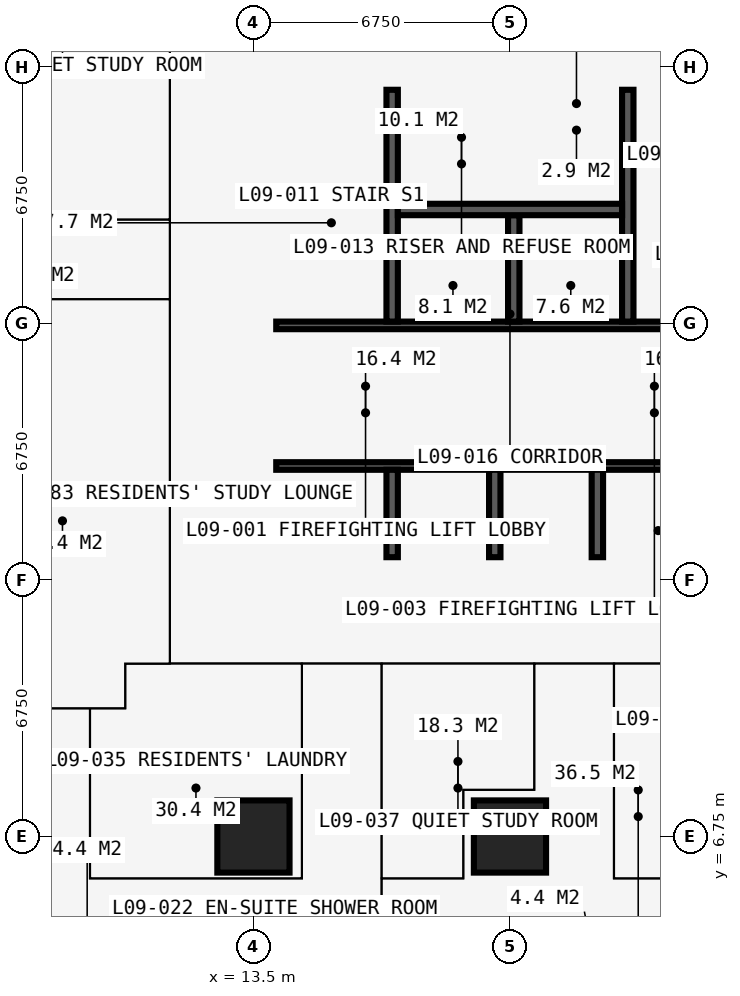
"""IFC4 building model, lengths in metres.
Left out: names, types, materials, properties, quantities, classifications, styles, units other than length and angle.
Written with IfcOpenShell. Run it as: python <this file> out.ifc"""

import sys

from ifc_helpers import new_model, si_unit, direction, frame, frame_2d, origin, origin_2d, place, context, subcontext, project, spatial, rectangle, extrude, element, fill, save


model = new_model("IFC4")
c1 = context("Model", 3, precision=1e-05, world=origin(), true_north=direction((0.0, 1.0)))
c2 = subcontext(c1, "Body", "Model", "MODEL_VIEW")
j1 = project(units=[si_unit("LENGTHUNIT", "METRE"), si_unit("PLANEANGLEUNIT", "RADIAN")], contexts=[c1])
p1 = place(None, origin())
s1 = spatial("IfcSite", under=j1, at=p1, CompositionType="ELEMENT")
p2 = place(p1, origin())
s2 = spatial("IfcBuilding", under=s1, at=p2, CompositionType="ELEMENT")
p3 = place(p2, frame((0.0, 0.0, 36.0)))
s3 = spatial("IfcBuildingStorey", under=s2, at=p3, CompositionType="ELEMENT", Elevation=36.0)
for number, where, z_axis, x_axis in (
    (1, (13.5, 6.75, 0.0), (0.0, 0.0, 1.0), (1.0, 0.0, 0.0)),
    (2, (20.25, 6.75, 0.0), (0.0, 0.0, 1.0), (1.0, 0.0, 0.0)),
):
    element("IfcColumn", number, at=place(p3, frame(where, z_axis=z_axis, x_axis=x_axis)), inside=s3, PredefinedType="COLUMN", context=c2, shape_type="SweptSolid", body=[
        extrude(rectangle(XDim=1.9, YDim=1.9, at=origin_2d()), origin(), (0.0, 0.0, 1.0), 3.6),
    ])
p4 = place(p3, frame((12.9, 13.5, 0.0), z_axis=(0.0, 0.0, 1.0), x_axis=(1.0, 0.0, 0.0)))
e3 = element("IfcWall", 3, at=p4, inside=s3, PredefinedType="SHEAR", context=c2, shape_type="SweptSolid", body=[
    extrude(rectangle(XDim=14.7, YDim=1.2, at=frame_2d((7.35, 0.0))), origin(), (0.0, 0.0, 1.0), 3.6),
])
p5 = place(p3, frame((27.6, 27.0, 0.0), z_axis=(0.0, 0.0, 1.0), x_axis=(-1.0, 0.0, 0.0)))
e4 = element("IfcWall", 4, at=p5, inside=s3, PredefinedType="SHEAR", context=c2, shape_type="SweptSolid", body=[
    extrude(rectangle(XDim=14.7, YDim=1.2, at=frame_2d((7.35, 0.0))), origin(), (0.0, 0.0, 1.0), 3.6),
])
p6 = place(p5, frame((4.55, 0.0, 0.0)))
e5 = element("IfcOpeningElement", 5, at=p6, cuts=e4, PredefinedType="OPENING", context=c2, shape_type="SweptSolid", body=[
    extrude(rectangle(XDim=0.9, YDim=2.2, at=frame_2d((0.45, 1.1))), frame((0.0, 0.61, 0.0), z_axis=(0.0, -1.0, 0.0), x_axis=(1.0, 0.0, 0.0)), (0.0, 0.0, 1.0), 1.22),
])
p7 = place(p5, frame((7.525, 0.0, 0.0)))
e6 = element("IfcOpeningElement", 6, at=p7, cuts=e4, PredefinedType="OPENING", context=c2, shape_type="SweptSolid", body=[
    extrude(rectangle(XDim=1.0, YDim=2.2, at=frame_2d((0.5, 1.1))), frame((0.0, 0.61, 0.0), z_axis=(0.0, -1.0, 0.0), x_axis=(1.0, 0.0, 0.0)), (0.0, 0.0, 1.0), 1.22),
])
p8 = place(p3, frame((13.5, 26.4, 0.0), z_axis=(0.0, 0.0, 1.0), x_axis=(0.0, -1.0, 0.0)))
e7 = element("IfcWall", 7, at=p8, inside=s3, PredefinedType="SHEAR", context=c2, shape_type="SweptSolid", body=[
    extrude(rectangle(XDim=12.3, YDim=1.2, at=frame_2d((6.15, 0.0))), origin(), (0.0, 0.0, 1.0), 3.6),
])
p9 = place(p8, frame((7.45, 0.0, 0.0)))
e8 = element("IfcOpeningElement", 8, at=p9, cuts=e7, PredefinedType="OPENING", context=c2, shape_type="SweptSolid", body=[
    extrude(rectangle(XDim=1.2, YDim=2.2, at=frame_2d((0.6, 1.1))), frame((0.0, 0.61, 0.0), z_axis=(0.0, -1.0, 0.0), x_axis=(1.0, 0.0, 0.0)), (0.0, 0.0, 1.0), 1.22),
])
p10 = place(p3, frame((14.1, 16.5, 0.0), z_axis=(0.0, 0.0, 1.0), x_axis=(1.0, 0.0, 0.0)))
e9 = element("IfcWall", 9, at=p10, inside=s3, PredefinedType="SHEAR", context=c2, shape_type="SweptSolid", body=[
    extrude(rectangle(XDim=12.3, YDim=0.2, at=frame_2d((6.15, 0.0))), origin(), (0.0, 0.0, 1.0), 3.6),
])
p11 = place(p10, frame((0.9, 0.0, 0.0)))
e10 = element("IfcOpeningElement", 10, at=p11, cuts=e9, PredefinedType="OPENING", context=c2, shape_type="SweptSolid", body=[
    extrude(rectangle(XDim=1.1, YDim=2.2, at=frame_2d((0.55, 1.1))), frame((0.0, 0.11, 0.0), z_axis=(0.0, -1.0, 0.0), x_axis=(1.0, 0.0, 0.0)), (0.0, 0.0, 1.0), 0.22),
])
p12 = place(p10, frame((9.5, 0.0, 0.0)))
e11 = element("IfcOpeningElement", 11, at=p12, cuts=e9, PredefinedType="OPENING", context=c2, shape_type="SweptSolid", body=[
    extrude(rectangle(XDim=1.1, YDim=2.2, at=frame_2d((0.55, 1.1))), frame((0.0, 0.11, 0.0), z_axis=(0.0, -1.0, 0.0), x_axis=(1.0, 0.0, 0.0)), (0.0, 0.0, 1.0), 0.22),
])
p13 = place(p3, frame((14.1, 20.2, 0.0), z_axis=(0.0, 0.0, 1.0), x_axis=(1.0, 0.0, 0.0)))
e12 = element("IfcWall", 12, at=p13, inside=s3, PredefinedType="SHEAR", context=c2, shape_type="SweptSolid", body=[
    extrude(rectangle(XDim=12.3, YDim=0.2, at=frame_2d((6.15, 0.0))), origin(), (0.0, 0.0, 1.0), 3.6),
])
p14 = place(p13, frame((0.35, 0.0, 0.0)))
e13 = element("IfcOpeningElement", 13, at=p14, cuts=e12, PredefinedType="OPENING", context=c2, shape_type="SweptSolid", body=[
    extrude(rectangle(XDim=1.1, YDim=2.2, at=frame_2d((0.55, 1.1))), frame((0.0, 0.11, 0.0), z_axis=(0.0, -1.0, 0.0), x_axis=(1.0, 0.0, 0.0)), (0.0, 0.0, 1.0), 0.22),
])
p15 = place(p13, frame((9.75, 0.0, 0.0)))
e14 = element("IfcOpeningElement", 14, at=p15, cuts=e12, PredefinedType="OPENING", context=c2, shape_type="SweptSolid", body=[
    extrude(rectangle(XDim=1.1, YDim=2.2, at=frame_2d((0.55, 1.1))), frame((0.0, 0.11, 0.0), z_axis=(0.0, -1.0, 0.0), x_axis=(1.0, 0.0, 0.0)), (0.0, 0.0, 1.0), 0.22),
])
for number, where, z_axis, x_axis in (
    (15, (17.15, 20.3, 0.0), (0.0, 0.0, 1.0), (0.0, 1.0, 0.0)),
    (16, (23.35, 20.3, 0.0), (0.0, 0.0, 1.0), (0.0, 1.0, 0.0)),
):
    element("IfcWall", number, at=place(p3, frame(where, z_axis=z_axis, x_axis=x_axis)), inside=s3, PredefinedType="SHEAR", context=c2, shape_type="SweptSolid", body=[
        extrude(rectangle(XDim=6.1, YDim=0.3, at=frame_2d((3.05, 0.0))), origin(), (0.0, 0.0, 1.0), 3.6),
    ])
p16 = place(p3, frame((20.35, 20.3, 0.0), z_axis=(0.0, 0.0, 1.0), x_axis=(0.0, 1.0, 0.0)))
e17 = element("IfcWall", 17, at=p16, inside=s3, PredefinedType="SHEAR", context=c2, shape_type="SweptSolid", body=[
    extrude(rectangle(XDim=2.8, YDim=0.3, at=frame_2d((1.4, 0.0))), origin(), (0.0, 0.0, 1.0), 3.6),
])
p17 = place(p3, frame((17.3, 23.25, 0.0), z_axis=(0.0, 0.0, 1.0), x_axis=(1.0, 0.0, 0.0)))
e18 = element("IfcWall", 18, at=p17, inside=s3, PredefinedType="SHEAR", context=c2, shape_type="SweptSolid", body=[
    extrude(rectangle(XDim=5.9, YDim=0.3, at=frame_2d((2.95, 0.0))), origin(), (0.0, 0.0, 1.0), 3.6),
])
for number, where, z_axis, x_axis in (
    (19, (17.15, 14.1, 0.0), (0.0, 0.0, 1.0), (0.0, 1.0, 0.0)),
    (20, (19.85, 14.1, 0.0), (0.0, 0.0, 1.0), (0.0, 1.0, 0.0)),
    (21, (22.55, 14.1, 0.0), (0.0, 0.0, 1.0), (0.0, 1.0, 0.0)),
):
    element("IfcWall", number, at=place(p3, frame(where, z_axis=z_axis, x_axis=x_axis)), inside=s3, PredefinedType="SHEAR", context=c2, shape_type="SweptSolid", body=[
        extrude(rectangle(XDim=2.3, YDim=0.3, at=frame_2d((1.15, 0.0))), origin(), (0.0, 0.0, 1.0), 3.6),
    ])
p18 = place(p3, frame((18.875, 16.6, 0.0), z_axis=(0.0, 0.0, 1.0), x_axis=(0.0, 1.0, 0.0)))
e22 = element("IfcWall", 22, at=p18, inside=s3, PredefinedType="PARTITIONING", context=c2, shape_type="SweptSolid", body=[
    extrude(rectangle(XDim=3.5, YDim=0.15, at=frame_2d((1.75, 0.0))), origin(), (0.0, 0.0, 1.0), 3.375),
])
p19 = place(p18, frame((1.15, 0.0, 0.0)))
e23 = element("IfcOpeningElement", 23, at=p19, cuts=e22, PredefinedType="OPENING", context=c2, shape_type="SweptSolid", body=[
    extrude(rectangle(XDim=1.2, YDim=2.2, at=frame_2d((0.6, 1.1))), frame((0.0, 0.085, 0.0), z_axis=(0.0, -1.0, 0.0), x_axis=(1.0, 0.0, 0.0)), (0.0, 0.0, 1.0), 0.17),
])
p20 = place(p3, frame((21.625, 16.6, 0.0), z_axis=(0.0, 0.0, 1.0), x_axis=(0.0, 1.0, 0.0)))
e24 = element("IfcWall", 24, at=p20, inside=s3, PredefinedType="PARTITIONING", context=c2, shape_type="SweptSolid", body=[
    extrude(rectangle(XDim=3.5, YDim=0.15, at=frame_2d((1.75, 0.0))), origin(), (0.0, 0.0, 1.0), 3.375),
])
p21 = place(p20, frame((1.15, 0.0, 0.0)))
e25 = element("IfcOpeningElement", 25, at=p21, cuts=e24, PredefinedType="OPENING", context=c2, shape_type="SweptSolid", body=[
    extrude(rectangle(XDim=1.2, YDim=2.2, at=frame_2d((0.6, 1.1))), frame((0.0, 0.085, 0.0), z_axis=(0.0, -1.0, 0.0), x_axis=(1.0, 0.0, 0.0)), (0.0, 0.0, 1.0), 0.17),
])
p22 = place(p3, frame((20.725, 23.4, 0.0), z_axis=(0.0, 0.0, 1.0), x_axis=(0.0, 1.0, 0.0)))
e26 = element("IfcWall", 26, at=p22, inside=s3, PredefinedType="PARTITIONING", context=c2, shape_type="SweptSolid", body=[
    extrude(rectangle(XDim=3.0, YDim=0.15, at=frame_2d((1.5, 0.0))), origin(), (0.0, 0.0, 1.0), 3.375),
])
p23 = place(p3, frame((20.8, 25.1, 0.0), z_axis=(0.0, 0.0, 1.0), x_axis=(1.0, 0.0, 0.0)))
e27 = element("IfcWall", 27, at=p23, inside=s3, PredefinedType="PARTITIONING", context=c2, shape_type="SweptSolid", body=[
    extrude(rectangle(XDim=2.4, YDim=0.15, at=frame_2d((1.2, 0.0))), origin(), (0.0, 0.0, 1.0), 3.375),
])
p24 = place(p23, frame((0.75, 0.0, 0.0)))
e28 = element("IfcOpeningElement", 28, at=p24, cuts=e27, PredefinedType="OPENING", context=c2, shape_type="SweptSolid", body=[
    extrude(rectangle(XDim=0.9, YDim=2.2, at=frame_2d((0.45, 1.1))), frame((0.0, 0.085, 0.0), z_axis=(0.0, -1.0, 0.0), x_axis=(1.0, 0.0, 0.0)), (0.0, 0.0, 1.0), 0.17),
])
p25 = place(p3, frame((-0.734, 10.125, 0.0), z_axis=(0.0, 0.0, 1.0), x_axis=(1.0, 0.0, 0.0)))
e29 = element("IfcWall", 29, at=p25, inside=s3, PredefinedType="PARTITIONING", context=c2, shape_type="SweptSolid", body=[
    extrude(rectangle(XDim=10.859, YDim=0.15, at=frame_2d((5.429, 0.0))), origin(), (0.0, 0.0, 1.0), 3.375),
])
p26 = place(p25, frame((5.134, 0.0, 0.0)))
e30 = element("IfcOpeningElement", 30, at=p26, cuts=e29, PredefinedType="OPENING", context=c2, shape_type="SweptSolid", body=[
    extrude(rectangle(XDim=1.0, YDim=2.2, at=frame_2d((0.5, 1.1))), frame((0.0, 0.085, 0.0), z_axis=(0.0, -1.0, 0.0), x_axis=(1.0, 0.0, 0.0)), (0.0, 0.0, 1.0), 0.17),
])
for number, where, z_axis, x_axis in (
    (31, (5.65, 20.887, 0.0), (0.0, 0.0, 1.0), (1.0, 0.0, 0.0)),
    (32, (5.65, 22.988, 0.0), (0.0, 0.0, 1.0), (1.0, 0.0, 0.0)),
):
    element("IfcWall", number, at=place(p3, frame(where, z_axis=z_axis, x_axis=x_axis)), inside=s3, PredefinedType="PARTITIONING", context=c2, shape_type="SweptSolid", body=[
        extrude(rectangle(XDim=5.65, YDim=0.15, at=frame_2d((2.825, 0.0))), origin(), (0.0, 0.0, 1.0), 3.375),
    ])
p27 = place(p3, frame((9.2, 5.65, 0.0), z_axis=(0.0, 0.0, 1.0), x_axis=(0.0, 1.0, 0.0)))
e33 = element("IfcWall", 33, at=p27, inside=s3, PredefinedType="PARTITIONING", context=c2, shape_type="SweptSolid", body=[
    extrude(rectangle(XDim=4.475, YDim=0.15, at=frame_2d((2.238, 0.0))), origin(), (0.0, 0.0, 1.0), 3.375),
])
p28 = place(p3, frame((9.2, 5.65, 0.0), z_axis=(0.0, 0.0, 1.0), x_axis=(1.0, 0.0, 0.0)))
e34 = element("IfcWall", 34, at=p28, inside=s3, PredefinedType="PARTITIONING", context=c2, shape_type="SweptSolid", body=[
    extrude(rectangle(XDim=5.575, YDim=0.15, at=frame_2d((2.788, 0.0))), origin(), (0.0, 0.0, 1.0), 3.375),
])
p29 = place(p3, frame((10.125, 10.125, 0.0), z_axis=(0.0, 0.0, 1.0), x_axis=(0.0, 1.0, 0.0)))
e35 = element("IfcWall", 35, at=p29, inside=s3, PredefinedType="PARTITIONING", context=c2, shape_type="SweptSolid", body=[
    extrude(rectangle(XDim=1.175, YDim=0.15, at=frame_2d((0.587, 0.0))), origin(), (0.0, 0.0, 1.0), 3.375),
])
p30 = place(p3, frame((10.125, 11.3, 0.0), z_axis=(0.0, 0.0, 1.0), x_axis=(1.0, 0.0, 0.0)))
e36 = element("IfcWall", 36, at=p30, inside=s3, PredefinedType="PARTITIONING", context=c2, shape_type="SweptSolid", body=[
    extrude(rectangle(XDim=20.675, YDim=0.15, at=frame_2d((10.337, 0.0))), origin(), (0.0, 0.0, 1.0), 3.375),
])
p31 = place(p30, frame((5.2, 0.0, 0.0)))
e37 = element("IfcOpeningElement", 37, at=p31, cuts=e36, PredefinedType="OPENING", context=c2, shape_type="SweptSolid", body=[
    extrude(rectangle(XDim=1.0, YDim=2.2, at=frame_2d((0.5, 1.1))), frame((0.0, 0.085, 0.0), z_axis=(0.0, -1.0, 0.0), x_axis=(1.0, 0.0, 0.0)), (0.0, 0.0, 1.0), 0.17),
])
p32 = place(p30, frame((11.312, 0.0, 0.0)))
e38 = element("IfcOpeningElement", 38, at=p32, cuts=e36, PredefinedType="OPENING", context=c2, shape_type="SweptSolid", body=[
    extrude(rectangle(XDim=1.0, YDim=2.2, at=frame_2d((0.5, 1.1))), frame((0.0, 0.085, 0.0), z_axis=(0.0, -1.0, 0.0), x_axis=(1.0, 0.0, 0.0)), (0.0, 0.0, 1.0), 0.17),
])
p33 = place(p30, frame((2.425, 0.0, 0.0)))
e39 = element("IfcOpeningElement", 39, at=p33, cuts=e36, PredefinedType="OPENING", context=c2, shape_type="SweptSolid", body=[
    extrude(rectangle(XDim=0.95, YDim=2.2, at=frame_2d((0.475, 1.1))), frame((0.0, 0.085, 0.0), z_axis=(0.0, -1.0, 0.0), x_axis=(1.0, 0.0, 0.0)), (0.0, 0.0, 1.0), 0.17),
])
p34 = place(p3, frame((11.3, 11.3, 0.0), z_axis=(0.0, 0.0, 1.0), x_axis=(0.0, 1.0, 0.0)))
e40 = element("IfcWall", 40, at=p34, inside=s3, PredefinedType="PARTITIONING", context=c2, shape_type="SweptSolid", body=[
    extrude(rectangle(XDim=19.075, YDim=0.15, at=frame_2d((9.538, 0.0))), origin(), (0.0, 0.0, 1.0), 3.375),
])
p35 = place(p34, frame((10.137, 0.0, 0.0)))
e41 = element("IfcOpeningElement", 41, at=p35, cuts=e40, PredefinedType="OPENING", context=c2, shape_type="SweptSolid", body=[
    extrude(rectangle(XDim=1.0, YDim=2.2, at=frame_2d((0.5, 1.1))), frame((0.0, 0.085, 0.0), z_axis=(0.0, -1.0, 0.0), x_axis=(1.0, 0.0, 0.0)), (0.0, 0.0, 1.0), 0.17),
])
p36 = place(p3, frame((14.775, 5.65, 0.0), z_axis=(0.0, 0.0, 1.0), x_axis=(0.0, 1.0, 0.0)))
e42 = element("IfcWall", 42, at=p36, inside=s3, PredefinedType="PARTITIONING", context=c2, shape_type="SweptSolid", body=[
    extrude(rectangle(XDim=5.65, YDim=0.15, at=frame_2d((2.825, 0.0))), origin(), (0.0, 0.0, 1.0), 3.375),
])
p37 = place(p3, frame((16.875, -0.734, 0.0), z_axis=(0.0, 0.0, 1.0), x_axis=(0.0, 1.0, 0.0)))
e43 = element("IfcWall", 43, at=p37, inside=s3, PredefinedType="PARTITIONING", context=c2, shape_type="SweptSolid", body=[
    extrude(rectangle(XDim=12.034, YDim=0.15, at=frame_2d((6.017, 0.0))), origin(), (0.0, 0.0, 1.0), 3.375),
])
p38 = place(p3, frame((16.875, 5.65, 0.0), z_axis=(0.0, 0.0, 1.0), x_axis=(1.0, 0.0, 0.0)))
e44 = element("IfcWall", 44, at=p38, inside=s3, PredefinedType="PARTITIONING", context=c2, shape_type="SweptSolid", body=[
    extrude(rectangle(XDim=2.145, YDim=0.15, at=frame_2d((1.073, 0.0))), origin(), (0.0, 0.0, 1.0), 3.375),
])
p39 = place(p3, frame((19.02, 5.65, 0.0), z_axis=(0.0, 0.0, 1.0), x_axis=(0.0, 1.0, 0.0)))
e45 = element("IfcWall", 45, at=p39, inside=s3, PredefinedType="PARTITIONING", context=c2, shape_type="SweptSolid", body=[
    extrude(rectangle(XDim=2.33, YDim=0.15, at=frame_2d((1.165, 0.0))), origin(), (0.0, 0.0, 1.0), 3.375),
])
p40 = place(p3, frame((19.02, 7.98, 0.0), z_axis=(0.0, 0.0, 1.0), x_axis=(1.0, 0.0, 0.0)))
e46 = element("IfcWall", 46, at=p40, inside=s3, PredefinedType="PARTITIONING", context=c2, shape_type="SweptSolid", body=[
    extrude(rectangle(XDim=1.867, YDim=0.15, at=frame_2d((0.934, 0.0))), origin(), (0.0, 0.0, 1.0), 3.375),
])
p41 = place(p3, frame((20.887, 7.98, 0.0), z_axis=(0.0, 0.0, 1.0), x_axis=(0.0, 1.0, 0.0)))
e47 = element("IfcWall", 47, at=p41, inside=s3, PredefinedType="PARTITIONING", context=c2, shape_type="SweptSolid", body=[
    extrude(rectangle(XDim=3.32, YDim=0.15, at=frame_2d((1.66, 0.0))), origin(), (0.0, 0.0, 1.0), 3.375),
])
p42 = place(p41, frame((1.2, 0.0, 0.0)))
e48 = element("IfcOpeningElement", 48, at=p42, cuts=e47, PredefinedType="OPENING", context=c2, shape_type="SweptSolid", body=[
    extrude(rectangle(XDim=0.95, YDim=2.2, at=frame_2d((0.475, 1.1))), frame((0.0, 0.085, 0.0), z_axis=(0.0, -1.0, 0.0), x_axis=(1.0, 0.0, 0.0)), (0.0, 0.0, 1.0), 0.17),
])
p43 = place(p3, frame((22.988, 5.65, 0.0), z_axis=(0.0, 0.0, 1.0), x_axis=(1.0, 0.0, 0.0)))
e49 = element("IfcWall", 49, at=p43, inside=s3, PredefinedType="PARTITIONING", context=c2, shape_type="SweptSolid", body=[
    extrude(rectangle(XDim=7.387, YDim=0.15, at=frame_2d((3.694, 0.0))), origin(), (0.0, 0.0, 1.0), 3.375),
])
p44 = place(p43, frame((2.1, 0.0, 0.0)))
e50 = element("IfcOpeningElement", 50, at=p44, cuts=e49, PredefinedType="OPENING", context=c2, shape_type="SweptSolid", body=[
    extrude(rectangle(XDim=0.95, YDim=2.2, at=frame_2d((0.475, 1.1))), frame((0.0, 0.085, 0.0), z_axis=(0.0, -1.0, 0.0), x_axis=(1.0, 0.0, 0.0)), (0.0, 0.0, 1.0), 0.17),
])
p45 = place(p3, frame((22.988, 5.65, 0.0), z_axis=(0.0, 0.0, 1.0), x_axis=(0.0, 1.0, 0.0)))
e51 = element("IfcWall", 51, at=p45, inside=s3, PredefinedType="PARTITIONING", context=c2, shape_type="SweptSolid", body=[
    extrude(rectangle(XDim=5.65, YDim=0.15, at=frame_2d((2.825, 0.0))), origin(), (0.0, 0.0, 1.0), 3.375),
])
p46 = place(p11, origin())
e52 = element("IfcDoor", 52, at=p46, inside=s3, OperationType="DOUBLE_DOOR_SLIDING", PredefinedType="DOOR", context=c2, shape_type="SweptSolid", body=[
    extrude(rectangle(XDim=1.1, YDim=2.2, at=frame_2d((0.55, 1.1))), frame((0.0, 0.025, 0.0), z_axis=(0.0, -1.0, 0.0), x_axis=(1.0, 0.0, 0.0)), (0.0, 0.0, 1.0), 0.05),
])
fill(e10, e52)
p47 = place(p12, origin())
e53 = element("IfcDoor", 53, at=p47, inside=s3, OperationType="DOUBLE_DOOR_SLIDING", PredefinedType="DOOR", context=c2, shape_type="SweptSolid", body=[
    extrude(rectangle(XDim=1.1, YDim=2.2, at=frame_2d((0.55, 1.1))), frame((0.0, 0.025, 0.0), z_axis=(0.0, -1.0, 0.0), x_axis=(1.0, 0.0, 0.0)), (0.0, 0.0, 1.0), 0.05),
])
fill(e11, e53)
p48 = place(p9, origin())
e54 = element("IfcDoor", 54, at=p48, inside=s3, OperationType="DOUBLE_DOOR_SINGLE_SWING", PredefinedType="DOOR", context=c2, shape_type="SweptSolid", body=[
    extrude(rectangle(XDim=1.2, YDim=2.2, at=frame_2d((0.6, 1.1))), frame((0.0, 0.025, 0.0), z_axis=(0.0, -1.0, 0.0), x_axis=(1.0, 0.0, 0.0)), (0.0, 0.0, 1.0), 0.05),
])
fill(e8, e54)
p49 = place(p19, origin())
e55 = element("IfcDoor", 55, at=p49, inside=s3, OperationType="DOUBLE_DOOR_SINGLE_SWING", PredefinedType="DOOR", context=c2, shape_type="SweptSolid", body=[
    extrude(rectangle(XDim=1.2, YDim=2.2, at=frame_2d((0.6, 1.1))), frame((0.0, 0.025, 0.0), z_axis=(0.0, -1.0, 0.0), x_axis=(1.0, 0.0, 0.0)), (0.0, 0.0, 1.0), 0.05),
])
fill(e23, e55)
p50 = place(p21, origin())
e56 = element("IfcDoor", 56, at=p50, inside=s3, OperationType="DOUBLE_DOOR_SINGLE_SWING", PredefinedType="DOOR", context=c2, shape_type="SweptSolid", body=[
    extrude(rectangle(XDim=1.2, YDim=2.2, at=frame_2d((0.6, 1.1))), frame((0.0, 0.025, 0.0), z_axis=(0.0, -1.0, 0.0), x_axis=(1.0, 0.0, 0.0)), (0.0, 0.0, 1.0), 0.05),
])
fill(e25, e56)
p51 = place(p24, origin())
e57 = element("IfcDoor", 57, at=p51, inside=s3, OperationType="SINGLE_SWING_RIGHT", PredefinedType="DOOR", context=c2, shape_type="SweptSolid", body=[
    extrude(rectangle(XDim=0.9, YDim=2.2, at=frame_2d((0.45, 1.1))), frame((0.0, 0.025, 0.0), z_axis=(0.0, -1.0, 0.0), x_axis=(1.0, 0.0, 0.0)), (0.0, 0.0, 1.0), 0.05),
])
fill(e28, e57)
p52 = place(p6, origin())
e58 = element("IfcDoor", 58, at=p52, inside=s3, OperationType="SINGLE_SWING_LEFT", PredefinedType="DOOR", context=c2, shape_type="SweptSolid", body=[
    extrude(rectangle(XDim=0.9, YDim=2.2, at=frame_2d((0.45, 1.1))), frame((0.0, 0.4, 0.0), z_axis=(0.0, -1.0, 0.0), x_axis=(1.0, 0.0, 0.0)), (0.0, 0.0, 1.0), 0.8),
])
fill(e5, e58)
p53 = place(p7, origin())
e59 = element("IfcDoor", 59, at=p53, inside=s3, OperationType="SINGLE_SWING_LEFT", PredefinedType="DOOR", context=c2, shape_type="SweptSolid", body=[
    extrude(rectangle(XDim=1.0, YDim=2.2, at=frame_2d((0.5, 1.1))), frame((0.0, 0.025, 0.0), z_axis=(0.0, -1.0, 0.0), x_axis=(1.0, 0.0, 0.0)), (0.0, 0.0, 1.0), 0.05),
])
fill(e6, e59)
p54 = place(p14, origin())
e60 = element("IfcDoor", 60, at=p54, inside=s3, OperationType="SINGLE_SWING_LEFT", PredefinedType="DOOR", context=c2, shape_type="SweptSolid", body=[
    extrude(rectangle(XDim=1.1, YDim=2.2, at=frame_2d((0.55, 1.1))), frame((0.0, 0.025, 0.0), z_axis=(0.0, -1.0, 0.0), x_axis=(1.0, 0.0, 0.0)), (0.0, 0.0, 1.0), 0.05),
])
fill(e13, e60)
p55 = place(p15, origin())
e61 = element("IfcDoor", 61, at=p55, inside=s3, OperationType="SINGLE_SWING_LEFT", PredefinedType="DOOR", context=c2, shape_type="SweptSolid", body=[
    extrude(rectangle(XDim=1.1, YDim=2.2, at=frame_2d((0.55, 1.1))), frame((0.0, 0.025, 0.0), z_axis=(0.0, -1.0, 0.0), x_axis=(1.0, 0.0, 0.0)), (0.0, 0.0, 1.0), 0.05),
])
fill(e14, e61)
p56 = place(p31, origin())
e62 = element("IfcDoor", 62, at=p56, inside=s3, OperationType="SINGLE_SWING_LEFT", PredefinedType="DOOR", context=c2, shape_type="SweptSolid", body=[
    extrude(rectangle(XDim=1.0, YDim=2.2, at=frame_2d((0.5, 1.1))), frame((0.0, 0.025, 0.0), z_axis=(0.0, -1.0, 0.0), x_axis=(1.0, 0.0, 0.0)), (0.0, 0.0, 1.0), 0.05),
])
fill(e37, e62)
p57 = place(p32, origin())
e63 = element("IfcDoor", 63, at=p57, inside=s3, OperationType="SINGLE_SWING_LEFT", PredefinedType="DOOR", context=c2, shape_type="SweptSolid", body=[
    extrude(rectangle(XDim=1.0, YDim=2.2, at=frame_2d((0.5, 1.1))), frame((0.0, 0.025, 0.0), z_axis=(0.0, -1.0, 0.0), x_axis=(1.0, 0.0, 0.0)), (0.0, 0.0, 1.0), 0.05),
])
fill(e38, e63)
p58 = place(p33, origin())
e64 = element("IfcDoor", 64, at=p58, inside=s3, OperationType="SINGLE_SWING_LEFT", PredefinedType="DOOR", context=c2, shape_type="SweptSolid", body=[
    extrude(rectangle(XDim=0.95, YDim=2.2, at=frame_2d((0.475, 1.1))), frame((0.0, 0.025, 0.0), z_axis=(0.0, -1.0, 0.0), x_axis=(1.0, 0.0, 0.0)), (0.0, 0.0, 1.0), 0.05),
])
fill(e39, e64)
p59 = place(p42, origin())
e65 = element("IfcDoor", 65, at=p59, inside=s3, OperationType="SINGLE_SWING_LEFT", PredefinedType="DOOR", context=c2, shape_type="SweptSolid", body=[
    extrude(rectangle(XDim=0.95, YDim=2.2, at=frame_2d((0.475, 1.1))), frame((0.0, 0.025, 0.0), z_axis=(0.0, -1.0, 0.0), x_axis=(1.0, 0.0, 0.0)), (0.0, 0.0, 1.0), 0.05),
])
fill(e48, e65)
p60 = place(p35, origin())
e66 = element("IfcDoor", 66, at=p60, inside=s3, OperationType="SINGLE_SWING_LEFT", PredefinedType="DOOR", context=c2, shape_type="SweptSolid", body=[
    extrude(rectangle(XDim=1.0, YDim=2.2, at=frame_2d((0.5, 1.1))), frame((0.0, 0.025, 0.0), z_axis=(0.0, -1.0, 0.0), x_axis=(1.0, 0.0, 0.0)), (0.0, 0.0, 1.0), 0.05),
])
fill(e41, e66)
save(model, sys.argv[1])
